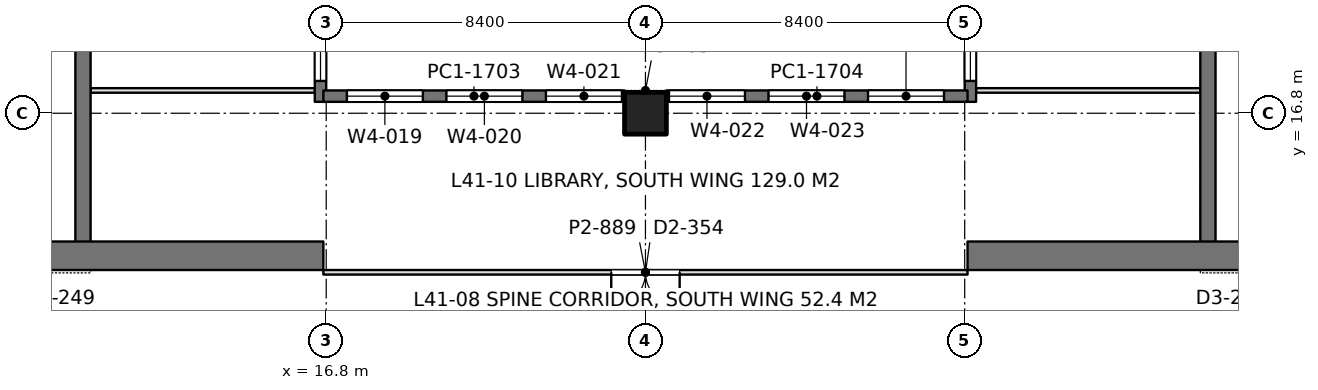
"""IFC4 building model, lengths in metres.
Left out: names, types, materials, properties, quantities, classifications, styles, units other than length and angle.
Written with IfcOpenShell. Run it as: python <this file> out.ifc"""

import sys

from ifc_helpers import new_model, si_unit, direction, frame, frame_2d, origin, origin_2d, place, context, subcontext, project, spatial, rectangle, extrude, element, fill, save


model = new_model("IFC4")
c1 = context("Model", 3, precision=1e-05, world=origin(), true_north=direction((0.0, 1.0)))
c2 = subcontext(c1, "Body", "Model", "MODEL_VIEW")
j1 = project(units=[si_unit("LENGTHUNIT", "METRE"), si_unit("PLANEANGLEUNIT", "RADIAN")], contexts=[c1])
p1 = place(None, origin())
s1 = spatial("IfcSite", under=j1, at=p1, CompositionType="ELEMENT")
p2 = place(p1, origin())
s2 = spatial("IfcBuilding", under=s1, at=p2, CompositionType="ELEMENT")
p3 = place(p2, frame((0.0, 0.0, 181.8)))
s3 = spatial("IfcBuildingStorey", under=s2, at=p3, CompositionType="ELEMENT", Elevation=181.8)
p4 = place(p3, frame((25.2, 16.8, 0.0), z_axis=(0.0, 0.0, 1.0), x_axis=(1.0, 0.0, 0.0)))
e1 = element("IfcColumn", 1, at=p4, inside=s3, PredefinedType="COLUMN", context=c2, shape_type="SweptSolid", body=[
    extrude(rectangle(XDim=1.1, YDim=1.1, at=origin_2d()), origin(), (0.0, 0.0, 1.0), 4.2),
])
p5 = place(p3, frame((-1.125, 13.05, 0.0), z_axis=(0.0, 0.0, 1.0), x_axis=(1.0, 0.0, 0.0)))
e2 = element("IfcWall", 2, at=p5, inside=s3, PredefinedType="SHEAR", context=c2, shape_type="SweptSolid", body=[
    extrude(rectangle(XDim=17.85, YDim=0.75, at=frame_2d((8.925, 0.0))), origin(), (0.0, 0.0, 1.0), 4.2),
])
p6 = place(p5, frame((8.875, 0.0, 0.0)))
e3 = element("IfcOpeningElement", 3, at=p6, cuts=e2, PredefinedType="OPENING", context=c2, shape_type="SweptSolid", body=[
    extrude(rectangle(XDim=1.8, YDim=2.4, at=frame_2d((0.9, 1.2))), frame((0.0, 0.385, 0.0), z_axis=(0.0, -1.0, 0.0), x_axis=(1.0, 0.0, 0.0)), (0.0, 0.0, 1.0), 0.77),
])
p7 = place(p3, frame((10.4, 13.05, 0.0), z_axis=(0.0, 0.0, 1.0), x_axis=(0.0, 1.0, 0.0)))
e4 = element("IfcWall", 4, at=p7, inside=s3, PredefinedType="SHEAR", context=c2, shape_type="SweptSolid", body=[
    extrude(rectangle(XDim=24.3, YDim=0.4, at=frame_2d((12.15, 0.0))), origin(), (0.0, 0.0, 1.0), 4.2),
])
p8 = place(p7, frame((15.75, 0.0, 0.0)))
e5 = element("IfcOpeningElement", 5, at=p8, cuts=e4, PredefinedType="OPENING", context=c2, shape_type="SweptSolid", body=[
    extrude(rectangle(XDim=1.1, YDim=2.2, at=frame_2d((0.55, 1.1))), frame((0.0, 0.21, 0.0), z_axis=(0.0, -1.0, 0.0), x_axis=(1.0, 0.0, 0.0)), (0.0, 0.0, 1.0), 0.42),
])
p9 = place(p7, frame((18.6, 0.0, 0.0)))
e6 = element("IfcOpeningElement", 6, at=p9, cuts=e4, PredefinedType="OPENING", context=c2, shape_type="SweptSolid", body=[
    extrude(rectangle(XDim=1.1, YDim=2.2, at=frame_2d((0.55, 1.1))), frame((0.0, 0.21, 0.0), z_axis=(0.0, -1.0, 0.0), x_axis=(1.0, 0.0, 0.0)), (0.0, 0.0, 1.0), 0.42),
])
p10 = place(p7, frame((21.45, 0.0, 0.0)))
e7 = element("IfcOpeningElement", 7, at=p10, cuts=e4, PredefinedType="OPENING", context=c2, shape_type="SweptSolid", body=[
    extrude(rectangle(XDim=1.1, YDim=2.2, at=frame_2d((0.55, 1.1))), frame((0.0, 0.21, 0.0), z_axis=(0.0, -1.0, 0.0), x_axis=(1.0, 0.0, 0.0)), (0.0, 0.0, 1.0), 0.42),
])
p11 = place(p7, frame((8.65, 0.0, 0.0)))
e8 = element("IfcOpeningElement", 8, at=p11, cuts=e4, PredefinedType="OPENING", context=c2, shape_type="SweptSolid", body=[
    extrude(rectangle(XDim=1.8, YDim=2.4, at=frame_2d((0.9, 1.2))), frame((0.0, 0.21, 0.0), z_axis=(0.0, -1.0, 0.0), x_axis=(1.0, 0.0, 0.0)), (0.0, 0.0, 1.0), 0.42),
])
p12 = place(p3, frame((33.675, 13.05, 0.0), z_axis=(0.0, 0.0, 1.0), x_axis=(1.0, 0.0, 0.0)))
e9 = element("IfcWall", 9, at=p12, inside=s3, PredefinedType="SHEAR", context=c2, shape_type="SweptSolid", body=[
    extrude(rectangle(XDim=17.85, YDim=0.75, at=frame_2d((8.925, 0.0))), origin(), (0.0, 0.0, 1.0), 4.2),
])
p13 = place(p12, frame((7.175, 0.0, 0.0)))
e10 = element("IfcOpeningElement", 10, at=p13, cuts=e9, PredefinedType="OPENING", context=c2, shape_type="SweptSolid", body=[
    extrude(rectangle(XDim=1.8, YDim=2.4, at=frame_2d((0.9, 1.2))), frame((0.0, 0.385, 0.0), z_axis=(0.0, -1.0, 0.0), x_axis=(1.0, 0.0, 0.0)), (0.0, 0.0, 1.0), 0.77),
])
p14 = place(p3, frame((40.0, 13.05, 0.0), z_axis=(0.0, 0.0, 1.0), x_axis=(0.0, 1.0, 0.0)))
e11 = element("IfcWall", 11, at=p14, inside=s3, PredefinedType="SHEAR", context=c2, shape_type="SweptSolid", body=[
    extrude(rectangle(XDim=24.3, YDim=0.4, at=frame_2d((12.15, 0.0))), origin(), (0.0, 0.0, 1.0), 4.2),
])
p15 = place(p14, frame((15.75, 0.0, 0.0)))
e12 = element("IfcOpeningElement", 12, at=p15, cuts=e11, PredefinedType="OPENING", context=c2, shape_type="SweptSolid", body=[
    extrude(rectangle(XDim=1.1, YDim=2.2, at=frame_2d((0.55, 1.1))), frame((0.0, 0.21, 0.0), z_axis=(0.0, -1.0, 0.0), x_axis=(1.0, 0.0, 0.0)), (0.0, 0.0, 1.0), 0.42),
])
p16 = place(p14, frame((18.6, 0.0, 0.0)))
e13 = element("IfcOpeningElement", 13, at=p16, cuts=e11, PredefinedType="OPENING", context=c2, shape_type="SweptSolid", body=[
    extrude(rectangle(XDim=1.1, YDim=2.2, at=frame_2d((0.55, 1.1))), frame((0.0, 0.21, 0.0), z_axis=(0.0, -1.0, 0.0), x_axis=(1.0, 0.0, 0.0)), (0.0, 0.0, 1.0), 0.42),
])
p17 = place(p14, frame((21.45, 0.0, 0.0)))
e14 = element("IfcOpeningElement", 14, at=p17, cuts=e11, PredefinedType="OPENING", context=c2, shape_type="SweptSolid", body=[
    extrude(rectangle(XDim=1.1, YDim=2.2, at=frame_2d((0.55, 1.1))), frame((0.0, 0.21, 0.0), z_axis=(0.0, -1.0, 0.0), x_axis=(1.0, 0.0, 0.0)), (0.0, 0.0, 1.0), 0.42),
])
p18 = place(p14, frame((8.65, 0.0, 0.0)))
e15 = element("IfcOpeningElement", 15, at=p18, cuts=e11, PredefinedType="OPENING", context=c2, shape_type="SweptSolid", body=[
    extrude(rectangle(XDim=1.8, YDim=2.4, at=frame_2d((0.9, 1.2))), frame((0.0, 0.21, 0.0), z_axis=(0.0, -1.0, 0.0), x_axis=(1.0, 0.0, 0.0)), (0.0, 0.0, 1.0), 0.42),
])
p19 = place(p3, frame((16.65, 17.1, 0.0), z_axis=(0.0, 0.0, 1.0), x_axis=(0.0, 1.0, 0.0)))
e16 = element("IfcWall", 16, at=p19, inside=s3, PredefinedType="SOLIDWALL", context=c2, shape_type="SweptSolid", body=[
    extrude(rectangle(XDim=10.7, YDim=0.3, at=frame_2d((5.35, 0.0))), origin(), (0.0, 0.0, 1.0), 4.05),
])
p20 = place(p19, frame((0.55, 0.0, 0.9)))
e17 = element("IfcOpeningElement", 17, at=p20, cuts=e16, PredefinedType="OPENING", context=c2, shape_type="SweptSolid", body=[
    extrude(rectangle(XDim=2.0, YDim=1.9, at=frame_2d((1.0, 0.95))), frame((0.0, 0.16, 0.0), z_axis=(0.0, -1.0, 0.0), x_axis=(1.0, 0.0, 0.0)), (0.0, 0.0, 1.0), 0.32),
])
p21 = place(p19, frame((2.9, 0.0, 0.9)))
e18 = element("IfcOpeningElement", 18, at=p21, cuts=e16, PredefinedType="OPENING", context=c2, shape_type="SweptSolid", body=[
    extrude(rectangle(XDim=2.0, YDim=1.9, at=frame_2d((1.0, 0.95))), frame((0.0, 0.16, 0.0), z_axis=(0.0, -1.0, 0.0), x_axis=(1.0, 0.0, 0.0)), (0.0, 0.0, 1.0), 0.32),
])
p22 = place(p19, frame((7.675, 0.0, 0.9)))
e19 = element("IfcOpeningElement", 19, at=p22, cuts=e16, PredefinedType="OPENING", context=c2, shape_type="SweptSolid", body=[
    extrude(rectangle(XDim=2.0, YDim=1.9, at=frame_2d((1.0, 0.95))), frame((0.0, 0.16, 0.0), z_axis=(0.0, -1.0, 0.0), x_axis=(1.0, 0.0, 0.0)), (0.0, 0.0, 1.0), 0.32),
])
p23 = place(p3, frame((33.75, 17.1, 0.0), z_axis=(0.0, 0.0, 1.0), x_axis=(0.0, 1.0, 0.0)))
e20 = element("IfcWall", 20, at=p23, inside=s3, PredefinedType="SOLIDWALL", context=c2, shape_type="SweptSolid", body=[
    extrude(rectangle(XDim=10.7, YDim=0.3, at=frame_2d((5.35, 0.0))), origin(), (0.0, 0.0, 1.0), 4.05),
])
p24 = place(p23, frame((0.55, 0.0, 0.9)))
e21 = element("IfcOpeningElement", 21, at=p24, cuts=e20, PredefinedType="OPENING", context=c2, shape_type="SweptSolid", body=[
    extrude(rectangle(XDim=2.0, YDim=1.9, at=frame_2d((1.0, 0.95))), frame((0.0, 0.16, 0.0), z_axis=(0.0, -1.0, 0.0), x_axis=(1.0, 0.0, 0.0)), (0.0, 0.0, 1.0), 0.32),
])
p25 = place(p23, frame((2.9, 0.0, 0.9)))
e22 = element("IfcOpeningElement", 22, at=p25, cuts=e20, PredefinedType="OPENING", context=c2, shape_type="SweptSolid", body=[
    extrude(rectangle(XDim=2.0, YDim=1.9, at=frame_2d((1.0, 0.95))), frame((0.0, 0.16, 0.0), z_axis=(0.0, -1.0, 0.0), x_axis=(1.0, 0.0, 0.0)), (0.0, 0.0, 1.0), 0.32),
])
p26 = place(p23, frame((7.675, 0.0, 0.9)))
e23 = element("IfcOpeningElement", 23, at=p26, cuts=e20, PredefinedType="OPENING", context=c2, shape_type="SweptSolid", body=[
    extrude(rectangle(XDim=2.0, YDim=1.9, at=frame_2d((1.0, 0.95))), frame((0.0, 0.16, 0.0), z_axis=(0.0, -1.0, 0.0), x_axis=(1.0, 0.0, 0.0)), (0.0, 0.0, 1.0), 0.32),
])
p27 = place(p3, frame((16.725, 17.25, 0.0), z_axis=(0.0, 0.0, 1.0), x_axis=(1.0, 0.0, 0.0)))
e24 = element("IfcWall", 24, at=p27, inside=s3, PredefinedType="SOLIDWALL", context=c2, shape_type="SweptSolid", body=[
    extrude(rectangle(XDim=7.925, YDim=0.3, at=frame_2d((3.962, 0.0))), origin(), (0.0, 0.0, 1.0), 4.05),
])
p28 = place(p27, frame((0.619, 0.0, 0.9)))
e25 = element("IfcOpeningElement", 25, at=p28, cuts=e24, PredefinedType="OPENING", context=c2, shape_type="SweptSolid", body=[
    extrude(rectangle(XDim=2.0, YDim=1.9, at=frame_2d((1.0, 0.95))), frame((0.0, 0.16, 0.0), z_axis=(0.0, -1.0, 0.0), x_axis=(1.0, 0.0, 0.0)), (0.0, 0.0, 1.0), 0.32),
])
p29 = place(p27, frame((3.238, 0.0, 0.9)))
e26 = element("IfcOpeningElement", 26, at=p29, cuts=e24, PredefinedType="OPENING", context=c2, shape_type="SweptSolid", body=[
    extrude(rectangle(XDim=2.0, YDim=1.9, at=frame_2d((1.0, 0.95))), frame((0.0, 0.16, 0.0), z_axis=(0.0, -1.0, 0.0), x_axis=(1.0, 0.0, 0.0)), (0.0, 0.0, 1.0), 0.32),
])
p30 = place(p27, frame((5.856, 0.0, 0.9)))
e27 = element("IfcOpeningElement", 27, at=p30, cuts=e24, PredefinedType="OPENING", context=c2, shape_type="SweptSolid", body=[
    extrude(rectangle(XDim=2.0, YDim=1.9, at=frame_2d((1.0, 0.95))), frame((0.0, 0.16, 0.0), z_axis=(0.0, -1.0, 0.0), x_axis=(1.0, 0.0, 0.0)), (0.0, 0.0, 1.0), 0.32),
])
p31 = place(p3, frame((25.75, 17.25, 0.0), z_axis=(0.0, 0.0, 1.0), x_axis=(1.0, 0.0, 0.0)))
e28 = element("IfcWall", 28, at=p31, inside=s3, PredefinedType="SOLIDWALL", context=c2, shape_type="SweptSolid", body=[
    extrude(rectangle(XDim=7.925, YDim=0.3, at=frame_2d((3.962, 0.0))), origin(), (0.0, 0.0, 1.0), 4.05),
])
p32 = place(p31, frame((0.069, 0.0, 0.9)))
e29 = element("IfcOpeningElement", 29, at=p32, cuts=e28, PredefinedType="OPENING", context=c2, shape_type="SweptSolid", body=[
    extrude(rectangle(XDim=2.0, YDim=1.9, at=frame_2d((1.0, 0.95))), frame((0.0, 0.16, 0.0), z_axis=(0.0, -1.0, 0.0), x_axis=(1.0, 0.0, 0.0)), (0.0, 0.0, 1.0), 0.32),
])
p33 = place(p31, frame((2.688, 0.0, 0.9)))
e30 = element("IfcOpeningElement", 30, at=p33, cuts=e28, PredefinedType="OPENING", context=c2, shape_type="SweptSolid", body=[
    extrude(rectangle(XDim=2.0, YDim=1.9, at=frame_2d((1.0, 0.95))), frame((0.0, 0.16, 0.0), z_axis=(0.0, -1.0, 0.0), x_axis=(1.0, 0.0, 0.0)), (0.0, 0.0, 1.0), 0.32),
])
p34 = place(p31, frame((5.306, 0.0, 0.9)))
e31 = element("IfcOpeningElement", 31, at=p34, cuts=e28, PredefinedType="OPENING", context=c2, shape_type="SweptSolid", body=[
    extrude(rectangle(XDim=2.0, YDim=1.9, at=frame_2d((1.0, 0.95))), frame((0.0, 0.16, 0.0), z_axis=(0.0, -1.0, 0.0), x_axis=(1.0, 0.0, 0.0)), (0.0, 0.0, 1.0), 0.32),
])
for number, where, z_axis, x_axis in (
    (32, (10.598, 17.4, 0.0), (0.0, 0.0, 1.0), (1.0, 0.0, 0.0)),
    (33, (33.898, 17.4, 0.0), (0.0, 0.0, 1.0), (1.0, 0.0, 0.0)),
):
    element("IfcWall", number, at=place(p3, frame(where, z_axis=z_axis, x_axis=x_axis)), inside=s3, PredefinedType="PARTITIONING", context=c2, shape_type="SweptSolid", body=[
        extrude(rectangle(XDim=5.904, YDim=0.12, at=frame_2d((2.952, 0.0))), origin(), (0.0, 0.0, 1.0), 3.55),
    ])
p35 = place(p3, frame((16.725, 12.615, 0.0), z_axis=(0.0, 0.0, 1.0), x_axis=(1.0, 0.0, 0.0)))
e34 = element("IfcWall", 34, at=p35, inside=s3, PredefinedType="PARTITIONING", context=c2, shape_type="SweptSolid", body=[
    extrude(rectangle(XDim=16.95, YDim=0.12, at=frame_2d((8.475, 0.0))), origin(), (0.0, 0.0, 1.0), 3.55),
])
p36 = place(p35, frame((7.575, 0.0, 0.0)))
e35 = element("IfcOpeningElement", 35, at=p36, cuts=e34, PredefinedType="OPENING", context=c2, shape_type="SweptSolid", body=[
    extrude(rectangle(XDim=1.8, YDim=2.2, at=frame_2d((0.9, 1.1))), frame((0.0, 0.07, 0.0), z_axis=(0.0, -1.0, 0.0), x_axis=(1.0, 0.0, 0.0)), (0.0, 0.0, 1.0), 0.14),
])
p37 = place(p20, origin())
e36 = element("IfcWindow", 36, at=p37, inside=s3, PartitioningType="SINGLE_PANEL", PredefinedType="WINDOW", context=c2, shape_type="SweptSolid", body=[
    extrude(rectangle(XDim=2.0, YDim=1.9, at=frame_2d((1.0, 0.95))), frame((0.0, 0.03, 0.0), z_axis=(0.0, -1.0, 0.0), x_axis=(1.0, 0.0, 0.0)), (0.0, 0.0, 1.0), 0.06),
])
fill(e17, e36)
p38 = place(p24, origin())
e37 = element("IfcWindow", 37, at=p38, inside=s3, PartitioningType="SINGLE_PANEL", PredefinedType="WINDOW", context=c2, shape_type="SweptSolid", body=[
    extrude(rectangle(XDim=2.0, YDim=1.9, at=frame_2d((1.0, 0.95))), frame((0.0, 0.03, 0.0), z_axis=(0.0, -1.0, 0.0), x_axis=(1.0, 0.0, 0.0)), (0.0, 0.0, 1.0), 0.06),
])
fill(e21, e37)
p39 = place(p28, origin())
e38 = element("IfcWindow", 38, at=p39, inside=s3, PartitioningType="SINGLE_PANEL", PredefinedType="WINDOW", context=c2, shape_type="SweptSolid", body=[
    extrude(rectangle(XDim=2.0, YDim=1.9, at=frame_2d((1.0, 0.95))), frame((0.0, 0.03, 0.0), z_axis=(0.0, -1.0, 0.0), x_axis=(1.0, 0.0, 0.0)), (0.0, 0.0, 1.0), 0.06),
])
fill(e25, e38)
p40 = place(p29, origin())
e39 = element("IfcWindow", 39, at=p40, inside=s3, PartitioningType="SINGLE_PANEL", PredefinedType="WINDOW", context=c2, shape_type="SweptSolid", body=[
    extrude(rectangle(XDim=2.0, YDim=1.9, at=frame_2d((1.0, 0.95))), frame((0.0, 0.03, 0.0), z_axis=(0.0, -1.0, 0.0), x_axis=(1.0, 0.0, 0.0)), (0.0, 0.0, 1.0), 0.06),
])
fill(e26, e39)
p41 = place(p30, origin())
e40 = element("IfcWindow", 40, at=p41, inside=s3, PartitioningType="SINGLE_PANEL", PredefinedType="WINDOW", context=c2, shape_type="SweptSolid", body=[
    extrude(rectangle(XDim=2.0, YDim=1.9, at=frame_2d((1.0, 0.95))), frame((0.0, 0.03, 0.0), z_axis=(0.0, -1.0, 0.0), x_axis=(1.0, 0.0, 0.0)), (0.0, 0.0, 1.0), 0.06),
])
fill(e27, e40)
p42 = place(p32, origin())
e41 = element("IfcWindow", 41, at=p42, inside=s3, PartitioningType="SINGLE_PANEL", PredefinedType="WINDOW", context=c2, shape_type="SweptSolid", body=[
    extrude(rectangle(XDim=2.0, YDim=1.9, at=frame_2d((1.0, 0.95))), frame((0.0, 0.03, 0.0), z_axis=(0.0, -1.0, 0.0), x_axis=(1.0, 0.0, 0.0)), (0.0, 0.0, 1.0), 0.06),
])
fill(e29, e41)
p43 = place(p33, origin())
e42 = element("IfcWindow", 42, at=p43, inside=s3, PartitioningType="SINGLE_PANEL", PredefinedType="WINDOW", context=c2, shape_type="SweptSolid", body=[
    extrude(rectangle(XDim=2.0, YDim=1.9, at=frame_2d((1.0, 0.95))), frame((0.0, 0.03, 0.0), z_axis=(0.0, -1.0, 0.0), x_axis=(1.0, 0.0, 0.0)), (0.0, 0.0, 1.0), 0.06),
])
fill(e30, e42)
p44 = place(p34, origin())
e43 = element("IfcWindow", 43, at=p44, inside=s3, PartitioningType="SINGLE_PANEL", PredefinedType="WINDOW", context=c2, shape_type="SweptSolid", body=[
    extrude(rectangle(XDim=2.0, YDim=1.9, at=frame_2d((1.0, 0.95))), frame((0.0, 0.03, 0.0), z_axis=(0.0, -1.0, 0.0), x_axis=(1.0, 0.0, 0.0)), (0.0, 0.0, 1.0), 0.06),
])
fill(e31, e43)
p45 = place(p36, frame((1.8, 0.0, 0.0), z_axis=(0.0, 0.0, 1.0), x_axis=(-1.0, 0.0, 0.0)))
e44 = element("IfcDoor", 44, at=p45, inside=s3, OperationType="DOUBLE_DOOR_SINGLE_SWING", PredefinedType="DOOR", context=c2, shape_type="SweptSolid", body=[
    extrude(rectangle(XDim=1.8, YDim=2.2, at=frame_2d((0.9, 1.1))), frame((0.0, 0.025, 0.0), z_axis=(0.0, -1.0, 0.0), x_axis=(1.0, 0.0, 0.0)), (0.0, 0.0, 1.0), 0.05),
])
fill(e35, e44)
save(model, sys.argv[1])
